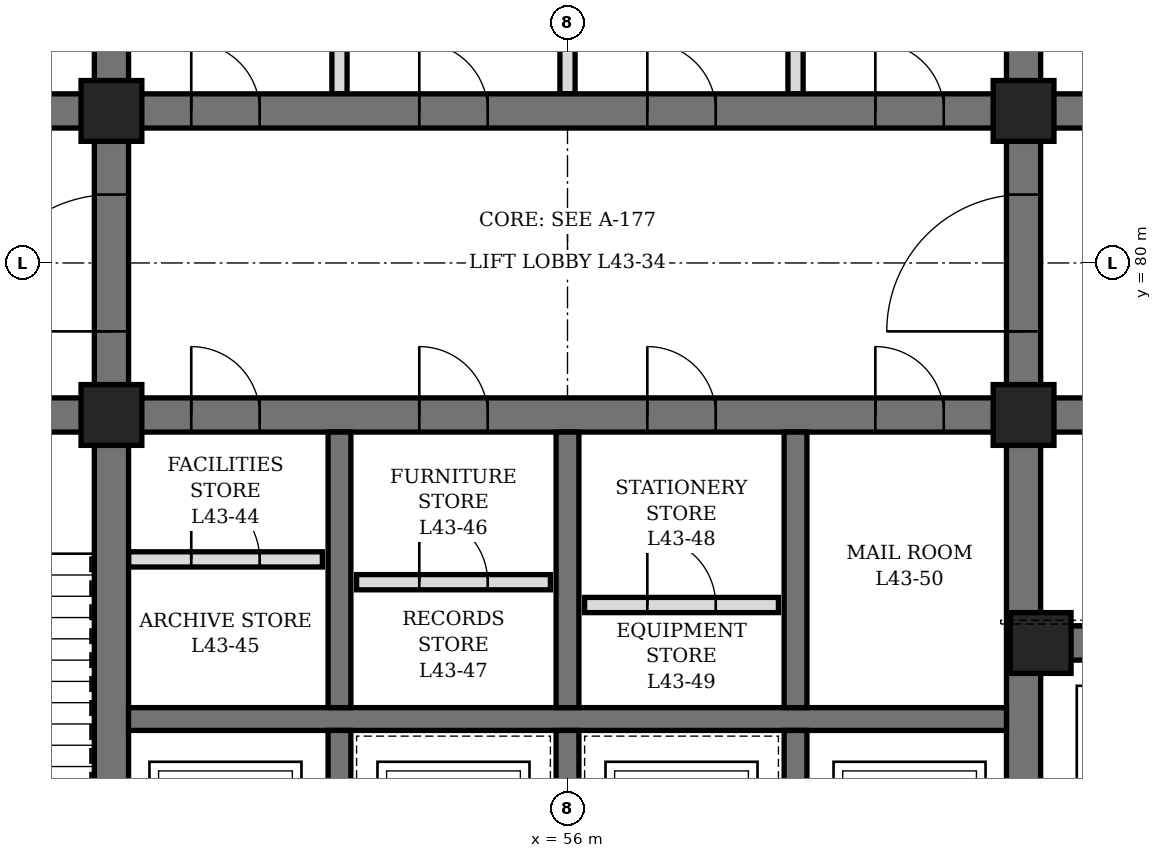
"""IFC4 building model, lengths in metres.
Left out: names, types, materials, properties, quantities, classifications, styles, units other than length and angle.
Written with IfcOpenShell. Run it as: python <this file> out.ifc"""

import sys

from ifc_helpers import new_model, si_unit, direction, frame, frame_2d, origin, origin_2d, place, context, subcontext, project, spatial, rectangle, hollow_rectangle, extrude, element, fill, save


model = new_model("IFC4")
c1 = context("Model", 3, precision=1e-05, world=origin(), true_north=direction((0.0, 1.0)))
c2 = subcontext(c1, "Body", "Model", "MODEL_VIEW")
j1 = project(units=[si_unit("LENGTHUNIT", "METRE"), si_unit("PLANEANGLEUNIT", "RADIAN")], contexts=[c1])
p1 = place(None, origin())
s1 = spatial("IfcSite", under=j1, at=p1, CompositionType="ELEMENT")
p2 = place(p1, origin())
s2 = spatial("IfcBuilding", under=s1, at=p2, CompositionType="ELEMENT")
p3 = place(p2, frame((0.0, 0.0, 193.9)))
s3 = spatial("IfcBuildingStorey", under=s2, at=p3, CompositionType="ELEMENT", Elevation=193.9)
p4 = place(p3, frame((50.0, 71.6, 0.0), z_axis=(0.0, 0.0, 1.0), x_axis=(0.0, 1.0, 0.0)))
e1 = element("IfcWall", 1, at=p4, inside=s3, PredefinedType="SHEAR", context=c2, shape_type="SweptSolid", body=[
    extrude(rectangle(XDim=16.8, YDim=0.45, at=frame_2d((8.4, 0.0))), origin(), (0.0, 0.0, 1.0), 4.2),
])
p5 = place(p4, frame((7.5, 0.0, 0.0)))
e2 = element("IfcOpeningElement", 2, at=p5, cuts=e1, PredefinedType="OPENING", context=c2, shape_type="SweptSolid", body=[
    extrude(rectangle(XDim=1.8, YDim=2.4, at=frame_2d((0.9, 1.2))), frame((0.0, 0.235, 0.0), z_axis=(0.0, -1.0, 0.0), x_axis=(1.0, 0.0, 0.0)), (0.0, 0.0, 1.0), 0.47),
])
p6 = place(p3, frame((62.0, 71.6, 0.0), z_axis=(0.0, 0.0, 1.0), x_axis=(0.0, 1.0, 0.0)))
e3 = element("IfcWall", 3, at=p6, inside=s3, PredefinedType="SHEAR", context=c2, shape_type="SweptSolid", body=[
    extrude(rectangle(XDim=16.8, YDim=0.45, at=frame_2d((8.4, 0.0))), origin(), (0.0, 0.0, 1.0), 4.2),
])
p7 = place(p6, frame((7.5, 0.0, 0.0)))
e4 = element("IfcOpeningElement", 4, at=p7, cuts=e3, PredefinedType="OPENING", context=c2, shape_type="SweptSolid", body=[
    extrude(rectangle(XDim=1.8, YDim=2.4, at=frame_2d((0.9, 1.2))), frame((0.0, 0.235, 0.0), z_axis=(0.0, -1.0, 0.0), x_axis=(1.0, 0.0, 0.0)), (0.0, 0.0, 1.0), 0.47),
])
p8 = place(p3, frame((44.6, 78.0, 0.0), z_axis=(0.0, 0.0, 1.0), x_axis=(1.0, 0.0, 0.0)))
e5 = element("IfcWall", 5, at=p8, inside=s3, PredefinedType="SHEAR", context=c2, shape_type="SweptSolid", body=[
    extrude(rectangle(XDim=5.175, YDim=0.45, at=frame_2d((2.587, 0.0))), origin(), (0.0, 0.0, 1.0), 4.2),
])
p9 = place(p8, frame((1.8, 0.0, 0.0)))
e6 = element("IfcOpeningElement", 6, at=p9, cuts=e5, PredefinedType="OPENING", context=c2, shape_type="SweptSolid", body=[
    extrude(rectangle(XDim=1.2, YDim=2.1, at=frame_2d((0.6, 1.05))), frame((0.0, 0.235, 0.0), z_axis=(0.0, -1.0, 0.0), x_axis=(1.0, 0.0, 0.0)), (0.0, 0.0, 1.0), 0.47),
])
p10 = place(p3, frame((44.6, 82.0, 0.0), z_axis=(0.0, 0.0, 1.0), x_axis=(1.0, 0.0, 0.0)))
e7 = element("IfcWall", 7, at=p10, inside=s3, PredefinedType="SHEAR", context=c2, shape_type="SweptSolid", body=[
    extrude(rectangle(XDim=5.175, YDim=0.45, at=frame_2d((2.587, 0.0))), origin(), (0.0, 0.0, 1.0), 4.2),
])
p11 = place(p10, frame((0.7, 0.0, 0.0)))
e8 = element("IfcOpeningElement", 8, at=p11, cuts=e7, PredefinedType="OPENING", context=c2, shape_type="SweptSolid", body=[
    extrude(rectangle(XDim=0.9, YDim=2.1, at=frame_2d((0.45, 1.05))), frame((0.0, 0.235, 0.0), z_axis=(0.0, -1.0, 0.0), x_axis=(1.0, 0.0, 0.0)), (0.0, 0.0, 1.0), 0.47),
])
p12 = place(p3, frame((62.225, 75.0, 0.0), z_axis=(0.0, 0.0, 1.0), x_axis=(1.0, 0.0, 0.0)))
e9 = element("IfcWall", 9, at=p12, inside=s3, PredefinedType="SHEAR", context=c2, shape_type="SweptSolid", body=[
    extrude(rectangle(XDim=5.175, YDim=0.45, at=frame_2d((2.587, 0.0))), origin(), (0.0, 0.0, 1.0), 4.2),
])
p13 = place(p12, frame((0.675, 0.0, 0.0)))
e10 = element("IfcOpeningElement", 10, at=p13, cuts=e9, PredefinedType="OPENING", context=c2, shape_type="SweptSolid", body=[
    extrude(rectangle(XDim=1.2, YDim=2.2, at=frame_2d((0.6, 1.1))), frame((0.0, 0.235, 0.0), z_axis=(0.0, -1.0, 0.0), x_axis=(1.0, 0.0, 0.0)), (0.0, 0.0, 1.0), 0.47),
])
p14 = place(p12, frame((3.425, 0.0, 0.0)))
e11 = element("IfcOpeningElement", 11, at=p14, cuts=e9, PredefinedType="OPENING", context=c2, shape_type="SweptSolid", body=[
    extrude(rectangle(XDim=1.2, YDim=2.2, at=frame_2d((0.6, 1.1))), frame((0.0, 0.235, 0.0), z_axis=(0.0, -1.0, 0.0), x_axis=(1.0, 0.0, 0.0)), (0.0, 0.0, 1.0), 0.47),
])
p15 = place(p3, frame((62.225, 78.0, 0.0), z_axis=(0.0, 0.0, 1.0), x_axis=(1.0, 0.0, 0.0)))
e12 = element("IfcWall", 12, at=p15, inside=s3, PredefinedType="SHEAR", context=c2, shape_type="SweptSolid", body=[
    extrude(rectangle(XDim=5.175, YDim=0.45, at=frame_2d((2.587, 0.0))), origin(), (0.0, 0.0, 1.0), 4.2),
])
p16 = place(p15, frame((2.175, 0.0, 0.0)))
e13 = element("IfcOpeningElement", 13, at=p16, cuts=e12, PredefinedType="OPENING", context=c2, shape_type="SweptSolid", body=[
    extrude(rectangle(XDim=1.2, YDim=2.1, at=frame_2d((0.6, 1.05))), frame((0.0, 0.235, 0.0), z_axis=(0.0, -1.0, 0.0), x_axis=(1.0, 0.0, 0.0)), (0.0, 0.0, 1.0), 0.47),
])
p17 = place(p3, frame((62.225, 82.0, 0.0), z_axis=(0.0, 0.0, 1.0), x_axis=(1.0, 0.0, 0.0)))
e14 = element("IfcWall", 14, at=p17, inside=s3, PredefinedType="SHEAR", context=c2, shape_type="SweptSolid", body=[
    extrude(rectangle(XDim=5.175, YDim=0.45, at=frame_2d((2.587, 0.0))), origin(), (0.0, 0.0, 1.0), 4.2),
])
p18 = place(p17, frame((2.175, 0.0, 0.0)))
e15 = element("IfcOpeningElement", 15, at=p18, cuts=e14, PredefinedType="OPENING", context=c2, shape_type="SweptSolid", body=[
    extrude(rectangle(XDim=1.2, YDim=2.1, at=frame_2d((0.6, 1.05))), frame((0.0, 0.235, 0.0), z_axis=(0.0, -1.0, 0.0), x_axis=(1.0, 0.0, 0.0)), (0.0, 0.0, 1.0), 0.47),
])
p19 = place(p3, frame((50.225, 78.0, 0.0), z_axis=(0.0, 0.0, 1.0), x_axis=(1.0, 0.0, 0.0)))
e16 = element("IfcWall", 16, at=p19, inside=s3, PredefinedType="SHEAR", context=c2, shape_type="SweptSolid", body=[
    extrude(rectangle(XDim=11.55, YDim=0.45, at=frame_2d((5.775, 0.0))), origin(), (0.0, 0.0, 1.0), 4.2),
])
p20 = place(p19, frame((0.825, 0.0, 0.0)))
e17 = element("IfcOpeningElement", 17, at=p20, cuts=e16, PredefinedType="OPENING", context=c2, shape_type="SweptSolid", body=[
    extrude(rectangle(XDim=0.9, YDim=2.1, at=frame_2d((0.45, 1.05))), frame((0.0, 0.235, 0.0), z_axis=(0.0, -1.0, 0.0), x_axis=(1.0, 0.0, 0.0)), (0.0, 0.0, 1.0), 0.47),
])
p21 = place(p19, frame((3.825, 0.0, 0.0)))
e18 = element("IfcOpeningElement", 18, at=p21, cuts=e16, PredefinedType="OPENING", context=c2, shape_type="SweptSolid", body=[
    extrude(rectangle(XDim=0.9, YDim=2.1, at=frame_2d((0.45, 1.05))), frame((0.0, 0.235, 0.0), z_axis=(0.0, -1.0, 0.0), x_axis=(1.0, 0.0, 0.0)), (0.0, 0.0, 1.0), 0.47),
])
p22 = place(p19, frame((6.825, 0.0, 0.0)))
e19 = element("IfcOpeningElement", 19, at=p22, cuts=e16, PredefinedType="OPENING", context=c2, shape_type="SweptSolid", body=[
    extrude(rectangle(XDim=0.9, YDim=2.1, at=frame_2d((0.45, 1.05))), frame((0.0, 0.235, 0.0), z_axis=(0.0, -1.0, 0.0), x_axis=(1.0, 0.0, 0.0)), (0.0, 0.0, 1.0), 0.47),
])
p23 = place(p19, frame((9.825, 0.0, 0.0)))
e20 = element("IfcOpeningElement", 20, at=p23, cuts=e16, PredefinedType="OPENING", context=c2, shape_type="SweptSolid", body=[
    extrude(rectangle(XDim=0.9, YDim=2.1, at=frame_2d((0.45, 1.05))), frame((0.0, 0.235, 0.0), z_axis=(0.0, -1.0, 0.0), x_axis=(1.0, 0.0, 0.0)), (0.0, 0.0, 1.0), 0.47),
])
p24 = place(p3, frame((50.225, 82.0, 0.0), z_axis=(0.0, 0.0, 1.0), x_axis=(1.0, 0.0, 0.0)))
e21 = element("IfcWall", 21, at=p24, inside=s3, PredefinedType="SHEAR", context=c2, shape_type="SweptSolid", body=[
    extrude(rectangle(XDim=11.55, YDim=0.45, at=frame_2d((5.775, 0.0))), origin(), (0.0, 0.0, 1.0), 4.2),
])
p25 = place(p24, frame((0.825, 0.0, 0.0)))
e22 = element("IfcOpeningElement", 22, at=p25, cuts=e21, PredefinedType="OPENING", context=c2, shape_type="SweptSolid", body=[
    extrude(rectangle(XDim=0.9, YDim=2.1, at=frame_2d((0.45, 1.05))), frame((0.0, 0.235, 0.0), z_axis=(0.0, -1.0, 0.0), x_axis=(1.0, 0.0, 0.0)), (0.0, 0.0, 1.0), 0.47),
])
p26 = place(p24, frame((3.825, 0.0, 0.0)))
e23 = element("IfcOpeningElement", 23, at=p26, cuts=e21, PredefinedType="OPENING", context=c2, shape_type="SweptSolid", body=[
    extrude(rectangle(XDim=0.9, YDim=2.1, at=frame_2d((0.45, 1.05))), frame((0.0, 0.235, 0.0), z_axis=(0.0, -1.0, 0.0), x_axis=(1.0, 0.0, 0.0)), (0.0, 0.0, 1.0), 0.47),
])
p27 = place(p24, frame((6.825, 0.0, 0.0)))
e24 = element("IfcOpeningElement", 24, at=p27, cuts=e21, PredefinedType="OPENING", context=c2, shape_type="SweptSolid", body=[
    extrude(rectangle(XDim=0.9, YDim=2.1, at=frame_2d((0.45, 1.05))), frame((0.0, 0.235, 0.0), z_axis=(0.0, -1.0, 0.0), x_axis=(1.0, 0.0, 0.0)), (0.0, 0.0, 1.0), 0.47),
])
p28 = place(p24, frame((9.825, 0.0, 0.0)))
e25 = element("IfcOpeningElement", 25, at=p28, cuts=e21, PredefinedType="OPENING", context=c2, shape_type="SweptSolid", body=[
    extrude(rectangle(XDim=0.9, YDim=2.1, at=frame_2d((0.45, 1.05))), frame((0.0, 0.235, 0.0), z_axis=(0.0, -1.0, 0.0), x_axis=(1.0, 0.0, 0.0)), (0.0, 0.0, 1.0), 0.47),
])
p29 = place(p3, frame((50.225, 74.0, 0.0), z_axis=(0.0, 0.0, 1.0), x_axis=(1.0, 0.0, 0.0)))
e26 = element("IfcWall", 26, at=p29, inside=s3, PredefinedType="SHEAR", context=c2, shape_type="SweptSolid", body=[
    extrude(rectangle(XDim=11.55, YDim=0.3, at=frame_2d((5.775, 0.0))), origin(), (0.0, 0.0, 1.0), 4.2),
])
p30 = place(p3, frame((53.0, 71.6, 0.0), z_axis=(0.0, 0.0, 1.0), x_axis=(0.0, 1.0, 0.0)))
e27 = element("IfcWall", 27, at=p30, inside=s3, PredefinedType="SHEAR", context=c2, shape_type="SweptSolid", body=[
    extrude(rectangle(XDim=2.25, YDim=0.3, at=frame_2d((1.125, 0.0))), origin(), (0.0, 0.0, 1.0), 4.2),
])
p31 = place(p3, frame((53.0, 74.15, 0.0), z_axis=(0.0, 0.0, 1.0), x_axis=(0.0, 1.0, 0.0)))
e28 = element("IfcWall", 28, at=p31, inside=s3, PredefinedType="SHEAR", context=c2, shape_type="SweptSolid", body=[
    extrude(rectangle(XDim=3.625, YDim=0.3, at=frame_2d((1.812, 0.0))), origin(), (0.0, 0.0, 1.0), 4.2),
])
p32 = place(p3, frame((56.0, 71.6, 0.0), z_axis=(0.0, 0.0, 1.0), x_axis=(0.0, 1.0, 0.0)))
e29 = element("IfcWall", 29, at=p32, inside=s3, PredefinedType="SHEAR", context=c2, shape_type="SweptSolid", body=[
    extrude(rectangle(XDim=2.25, YDim=0.3, at=frame_2d((1.125, 0.0))), origin(), (0.0, 0.0, 1.0), 4.2),
])
p33 = place(p3, frame((56.0, 74.15, 0.0), z_axis=(0.0, 0.0, 1.0), x_axis=(0.0, 1.0, 0.0)))
e30 = element("IfcWall", 30, at=p33, inside=s3, PredefinedType="SHEAR", context=c2, shape_type="SweptSolid", body=[
    extrude(rectangle(XDim=3.625, YDim=0.3, at=frame_2d((1.812, 0.0))), origin(), (0.0, 0.0, 1.0), 4.2),
])
p34 = place(p3, frame((59.0, 71.6, 0.0), z_axis=(0.0, 0.0, 1.0), x_axis=(0.0, 1.0, 0.0)))
e31 = element("IfcWall", 31, at=p34, inside=s3, PredefinedType="SHEAR", context=c2, shape_type="SweptSolid", body=[
    extrude(rectangle(XDim=2.25, YDim=0.3, at=frame_2d((1.125, 0.0))), origin(), (0.0, 0.0, 1.0), 4.2),
])
p35 = place(p3, frame((59.0, 74.15, 0.0), z_axis=(0.0, 0.0, 1.0), x_axis=(0.0, 1.0, 0.0)))
e32 = element("IfcWall", 32, at=p35, inside=s3, PredefinedType="SHEAR", context=c2, shape_type="SweptSolid", body=[
    extrude(rectangle(XDim=3.625, YDim=0.3, at=frame_2d((1.812, 0.0))), origin(), (0.0, 0.0, 1.0), 4.2),
])
for number, where, z_axis, x_axis in (
    (33, (50.0, 78.0, 0.0), (0.0, 0.0, 1.0), (1.0, 0.0, 0.0)),
    (34, (50.0, 82.0, 0.0), (0.0, 0.0, 1.0), (1.0, 0.0, 0.0)),
    (35, (62.0, 78.0, 0.0), (0.0, 0.0, 1.0), (1.0, 0.0, 0.0)),
    (36, (62.0, 82.0, 0.0), (0.0, 0.0, 1.0), (1.0, 0.0, 0.0)),
    (37, (62.225, 75.0, 0.0), (0.0, 0.0, 1.0), (1.0, 0.0, 0.0)),
):
    element("IfcColumn", number, at=place(p3, frame(where, z_axis=z_axis, x_axis=x_axis)), inside=s3, PredefinedType="COLUMN", context=c2, shape_type="SweptSolid", body=[
        extrude(hollow_rectangle(XDim=0.8, YDim=0.8, WallThickness=0.1, at=origin_2d()), origin(), (0.0, 0.0, 1.0), 4.2),
    ])
p36 = place(p3, frame((50.225, 76.1, 0.0), z_axis=(0.0, 0.0, 1.0), x_axis=(1.0, 0.0, 0.0)))
e38 = element("IfcWall", 38, at=p36, inside=s3, PredefinedType="PARTITIONING", context=c2, shape_type="SweptSolid", body=[
    extrude(rectangle(XDim=2.55, YDim=0.2, at=frame_2d((1.275, 0.0))), origin(), (0.0, 0.0, 1.0), 4.04),
])
p37 = place(p36, frame((0.825, 0.0, 0.0)))
e39 = element("IfcOpeningElement", 39, at=p37, cuts=e38, PredefinedType="OPENING", context=c2, shape_type="SweptSolid", body=[
    extrude(rectangle(XDim=0.9, YDim=2.1, at=frame_2d((0.45, 1.05))), frame((0.0, 0.11, 0.0), z_axis=(0.0, -1.0, 0.0), x_axis=(1.0, 0.0, 0.0)), (0.0, 0.0, 1.0), 0.22),
])
p38 = place(p3, frame((53.225, 75.8, 0.0), z_axis=(0.0, 0.0, 1.0), x_axis=(1.0, 0.0, 0.0)))
e40 = element("IfcWall", 40, at=p38, inside=s3, PredefinedType="PARTITIONING", context=c2, shape_type="SweptSolid", body=[
    extrude(rectangle(XDim=2.55, YDim=0.2, at=frame_2d((1.275, 0.0))), origin(), (0.0, 0.0, 1.0), 4.04),
])
p39 = place(p38, frame((0.825, 0.0, 0.0)))
e41 = element("IfcOpeningElement", 41, at=p39, cuts=e40, PredefinedType="OPENING", context=c2, shape_type="SweptSolid", body=[
    extrude(rectangle(XDim=0.9, YDim=2.1, at=frame_2d((0.45, 1.05))), frame((0.0, 0.11, 0.0), z_axis=(0.0, -1.0, 0.0), x_axis=(1.0, 0.0, 0.0)), (0.0, 0.0, 1.0), 0.22),
])
p40 = place(p3, frame((56.225, 75.5, 0.0), z_axis=(0.0, 0.0, 1.0), x_axis=(1.0, 0.0, 0.0)))
e42 = element("IfcWall", 42, at=p40, inside=s3, PredefinedType="PARTITIONING", context=c2, shape_type="SweptSolid", body=[
    extrude(rectangle(XDim=2.55, YDim=0.2, at=frame_2d((1.275, 0.0))), origin(), (0.0, 0.0, 1.0), 4.04),
])
p41 = place(p40, frame((0.825, 0.0, 0.0)))
e43 = element("IfcOpeningElement", 43, at=p41, cuts=e42, PredefinedType="OPENING", context=c2, shape_type="SweptSolid", body=[
    extrude(rectangle(XDim=0.9, YDim=2.1, at=frame_2d((0.45, 1.05))), frame((0.0, 0.11, 0.0), z_axis=(0.0, -1.0, 0.0), x_axis=(1.0, 0.0, 0.0)), (0.0, 0.0, 1.0), 0.22),
])
p42 = place(p3, frame((53.0, 82.225, 0.0), z_axis=(0.0, 0.0, 1.0), x_axis=(0.0, 1.0, 0.0)))
e44 = element("IfcWall", 44, at=p42, inside=s3, PredefinedType="PARTITIONING", context=c2, shape_type="SweptSolid", body=[
    extrude(rectangle(XDim=3.55, YDim=0.2, at=frame_2d((1.775, 0.0))), origin(), (0.0, 0.0, 1.0), 4.04),
])
p43 = place(p3, frame((56.0, 82.225, 0.0), z_axis=(0.0, 0.0, 1.0), x_axis=(0.0, 1.0, 0.0)))
e45 = element("IfcWall", 45, at=p43, inside=s3, PredefinedType="PARTITIONING", context=c2, shape_type="SweptSolid", body=[
    extrude(rectangle(XDim=3.55, YDim=0.2, at=frame_2d((1.775, 0.0))), origin(), (0.0, 0.0, 1.0), 3.14),
])
p44 = place(p3, frame((59.0, 82.225, 0.0), z_axis=(0.0, 0.0, 1.0), x_axis=(0.0, 1.0, 0.0)))
e46 = element("IfcWall", 46, at=p44, inside=s3, PredefinedType="PARTITIONING", context=c2, shape_type="SweptSolid", body=[
    extrude(rectangle(XDim=3.55, YDim=0.2, at=frame_2d((1.775, 0.0))), origin(), (0.0, 0.0, 1.0), 4.04),
])
p45 = place(p20, origin())
e47 = element("IfcDoor", 47, at=p45, inside=s3, OperationType="SINGLE_SWING_LEFT", PredefinedType="DOOR", context=c2, shape_type="SweptSolid", body=[
    extrude(rectangle(XDim=0.9, YDim=2.1, at=frame_2d((0.45, 1.05))), frame((0.0, 0.225, 0.0), z_axis=(0.0, -1.0, 0.0), x_axis=(1.0, 0.0, 0.0)), (0.0, 0.0, 1.0), 0.449),
])
fill(e17, e47)
p46 = place(p37, origin())
e48 = element("IfcDoor", 48, at=p46, inside=s3, OperationType="SINGLE_SWING_LEFT", PredefinedType="DOOR", context=c2, shape_type="SweptSolid", body=[
    extrude(rectangle(XDim=0.9, YDim=2.1, at=frame_2d((0.45, 1.05))), frame((0.0, 0.1, 0.0), z_axis=(0.0, -1.0, 0.0), x_axis=(1.0, 0.0, 0.0)), (0.0, 0.0, 1.0), 0.199),
])
fill(e39, e48)
p47 = place(p21, origin())
e49 = element("IfcDoor", 49, at=p47, inside=s3, OperationType="SINGLE_SWING_LEFT", PredefinedType="DOOR", context=c2, shape_type="SweptSolid", body=[
    extrude(rectangle(XDim=0.9, YDim=2.1, at=frame_2d((0.45, 1.05))), frame((0.0, 0.225, 0.0), z_axis=(0.0, -1.0, 0.0), x_axis=(1.0, 0.0, 0.0)), (0.0, 0.0, 1.0), 0.449),
])
fill(e18, e49)
p48 = place(p39, origin())
e50 = element("IfcDoor", 50, at=p48, inside=s3, OperationType="SINGLE_SWING_LEFT", PredefinedType="DOOR", context=c2, shape_type="SweptSolid", body=[
    extrude(rectangle(XDim=0.9, YDim=2.1, at=frame_2d((0.45, 1.05))), frame((0.0, 0.1, 0.0), z_axis=(0.0, -1.0, 0.0), x_axis=(1.0, 0.0, 0.0)), (0.0, 0.0, 1.0), 0.199),
])
fill(e41, e50)
p49 = place(p22, origin())
e51 = element("IfcDoor", 51, at=p49, inside=s3, OperationType="SINGLE_SWING_LEFT", PredefinedType="DOOR", context=c2, shape_type="SweptSolid", body=[
    extrude(rectangle(XDim=0.9, YDim=2.1, at=frame_2d((0.45, 1.05))), frame((0.0, 0.225, 0.0), z_axis=(0.0, -1.0, 0.0), x_axis=(1.0, 0.0, 0.0)), (0.0, 0.0, 1.0), 0.449),
])
fill(e19, e51)
p50 = place(p41, origin())
e52 = element("IfcDoor", 52, at=p50, inside=s3, OperationType="SINGLE_SWING_LEFT", PredefinedType="DOOR", context=c2, shape_type="SweptSolid", body=[
    extrude(rectangle(XDim=0.9, YDim=2.1, at=frame_2d((0.45, 1.05))), frame((0.0, 0.1, 0.0), z_axis=(0.0, -1.0, 0.0), x_axis=(1.0, 0.0, 0.0)), (0.0, 0.0, 1.0), 0.199),
])
fill(e43, e52)
p51 = place(p23, origin())
e53 = element("IfcDoor", 53, at=p51, inside=s3, OperationType="SINGLE_SWING_LEFT", PredefinedType="DOOR", context=c2, shape_type="SweptSolid", body=[
    extrude(rectangle(XDim=0.9, YDim=2.1, at=frame_2d((0.45, 1.05))), frame((0.0, 0.225, 0.0), z_axis=(0.0, -1.0, 0.0), x_axis=(1.0, 0.0, 0.0)), (0.0, 0.0, 1.0), 0.449),
])
fill(e20, e53)
p52 = place(p25, origin())
e54 = element("IfcDoor", 54, at=p52, inside=s3, OperationType="SINGLE_SWING_LEFT", PredefinedType="DOOR", context=c2, shape_type="SweptSolid", body=[
    extrude(rectangle(XDim=0.9, YDim=2.1, at=frame_2d((0.45, 1.05))), frame((0.0, 0.225, 0.0), z_axis=(0.0, -1.0, 0.0), x_axis=(1.0, 0.0, 0.0)), (0.0, 0.0, 1.0), 0.449),
])
fill(e22, e54)
p53 = place(p26, origin())
e55 = element("IfcDoor", 55, at=p53, inside=s3, OperationType="SINGLE_SWING_LEFT", PredefinedType="DOOR", context=c2, shape_type="SweptSolid", body=[
    extrude(rectangle(XDim=0.9, YDim=2.1, at=frame_2d((0.45, 1.05))), frame((0.0, 0.225, 0.0), z_axis=(0.0, -1.0, 0.0), x_axis=(1.0, 0.0, 0.0)), (0.0, 0.0, 1.0), 0.449),
])
fill(e23, e55)
p54 = place(p27, origin())
e56 = element("IfcDoor", 56, at=p54, inside=s3, OperationType="SINGLE_SWING_LEFT", PredefinedType="DOOR", context=c2, shape_type="SweptSolid", body=[
    extrude(rectangle(XDim=0.9, YDim=2.1, at=frame_2d((0.45, 1.05))), frame((0.0, 0.225, 0.0), z_axis=(0.0, -1.0, 0.0), x_axis=(1.0, 0.0, 0.0)), (0.0, 0.0, 1.0), 0.449),
])
fill(e24, e56)
p55 = place(p28, origin())
e57 = element("IfcDoor", 57, at=p55, inside=s3, OperationType="SINGLE_SWING_LEFT", PredefinedType="DOOR", context=c2, shape_type="SweptSolid", body=[
    extrude(rectangle(XDim=0.9, YDim=2.1, at=frame_2d((0.45, 1.05))), frame((0.0, 0.225, 0.0), z_axis=(0.0, -1.0, 0.0), x_axis=(1.0, 0.0, 0.0)), (0.0, 0.0, 1.0), 0.449),
])
fill(e25, e57)
p56 = place(p5, origin())
e58 = element("IfcDoor", 58, at=p56, inside=s3, OperationType="DOUBLE_DOOR_SINGLE_SWING", PredefinedType="DOOR", context=c2, shape_type="SweptSolid", body=[
    extrude(rectangle(XDim=1.8, YDim=2.4, at=frame_2d((0.9, 1.2))), frame((0.0, 0.225, 0.0), z_axis=(0.0, -1.0, 0.0), x_axis=(1.0, 0.0, 0.0)), (0.0, 0.0, 1.0), 0.449),
])
fill(e2, e58)
p57 = place(p7, origin())
e59 = element("IfcDoor", 59, at=p57, inside=s3, OperationType="DOUBLE_DOOR_SINGLE_SWING", PredefinedType="DOOR", context=c2, shape_type="SweptSolid", body=[
    extrude(rectangle(XDim=1.8, YDim=2.4, at=frame_2d((0.9, 1.2))), frame((0.0, 0.225, 0.0), z_axis=(0.0, -1.0, 0.0), x_axis=(1.0, 0.0, 0.0)), (0.0, 0.0, 1.0), 0.449),
])
fill(e4, e59)
save(model, sys.argv[1])
